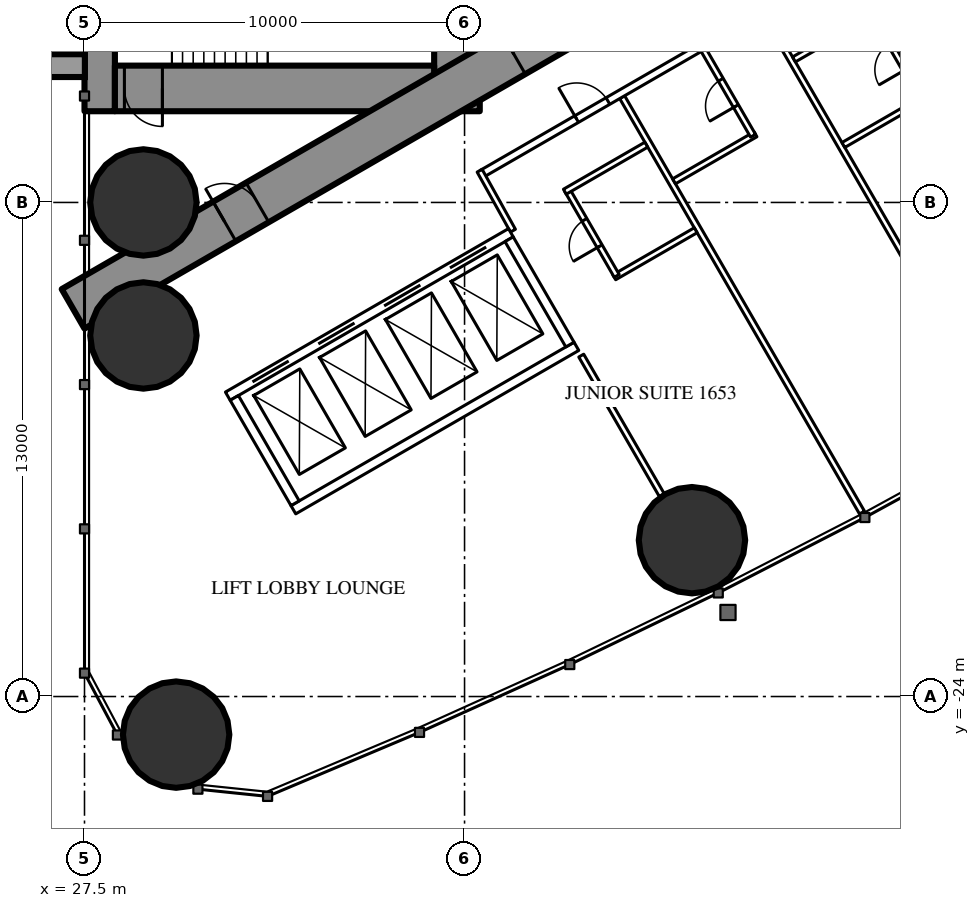
"""IFC4 building model, lengths in metres.
Left out: names, types, materials, properties, quantities, classifications, styles, units other than length and angle.
Written with IfcOpenShell. Run it as: python <this file> out.ifc"""

import sys

from ifc_helpers import new_model, si_unit, direction, frame, frame_2d, origin, origin_2d, place, context, subcontext, project, spatial, rectangle, hollow_circle, extrude, element, fill, save


model = new_model("IFC4")
c1 = context("Model", 3, precision=1e-05, world=origin(), true_north=direction((0.0, 1.0)))
c2 = subcontext(c1, "Body", "Model", "MODEL_VIEW")
j1 = project(units=[si_unit("LENGTHUNIT", "METRE"), si_unit("PLANEANGLEUNIT", "RADIAN")], contexts=[c1])
p1 = place(None, origin())
s1 = spatial("IfcSite", under=j1, at=p1, CompositionType="ELEMENT")
p2 = place(p1, origin())
s2 = spatial("IfcBuilding", under=s1, at=p2, CompositionType="ELEMENT")
p3 = place(p2, frame((0.0, 0.0, 63.5)))
s3 = spatial("IfcBuildingStorey", under=s2, at=p3, CompositionType="ELEMENT", Elevation=63.5)
for number, where, z_axis, x_axis in (
    (1, (29.911, -25.002, 0.0), (0.0, 0.0, 1.0), (1.0, 0.0, 0.0)),
    (2, (29.05, -11.0, 0.0), (0.0, 0.0, 1.0), (1.0, 0.0, 0.0)),
    (3, (29.05, -14.5, 0.0), (0.0, 0.0, 1.0), (1.0, 0.0, 0.0)),
    (4, (43.484, -19.886, 0.0), (0.0, 0.0, 1.0), (1.0, 0.0, 0.0)),
):
    element("IfcColumn", number, at=place(p3, frame(where, z_axis=z_axis, x_axis=x_axis)), inside=s3, PredefinedType="COLUMN", context=c2, shape_type="SweptSolid", body=[
        extrude(hollow_circle(Radius=1.4, WallThickness=0.12, at=origin_2d()), origin(), (0.0, 0.0, 1.0), 3.5),
    ])
p4 = place(p3, frame((27.9, -8.6, 0.0), z_axis=(0.0, 0.0, 1.0), x_axis=(0.0, 1.0, 0.0)))
e5 = element("IfcWall", 5, at=p4, inside=s3, PredefinedType="SHEAR", context=c2, shape_type="SweptSolid", body=[
    extrude(rectangle(XDim=17.2, YDim=0.8, at=frame_2d((8.6, 0.0))), origin(), (0.0, 0.0, 1.0), 3.5),
])
p5 = place(p4, frame((2.45, 0.0, 0.6)))
e6 = element("IfcOpeningElement", 6, at=p5, cuts=e5, PredefinedType="OPENING", context=c2, shape_type="SweptSolid", body=[
    extrude(rectangle(XDim=0.6, YDim=2.1, at=frame_2d((0.3, 1.05))), frame((0.0, 0.41, 0.0), z_axis=(0.0, -1.0, 0.0), x_axis=(1.0, 0.0, 0.0)), (0.0, 0.0, 1.0), 0.82),
])
p6 = place(p4, frame((14.15, 0.0, 0.6)))
e7 = element("IfcOpeningElement", 7, at=p6, cuts=e5, PredefinedType="OPENING", context=c2, shape_type="SweptSolid", body=[
    extrude(rectangle(XDim=0.6, YDim=2.1, at=frame_2d((0.3, 1.05))), frame((0.0, 0.41, 0.0), z_axis=(0.0, -1.0, 0.0), x_axis=(1.0, 0.0, 0.0)), (0.0, 0.0, 1.0), 0.82),
])
p7 = place(p3, frame((37.3, -8.6, 0.0), z_axis=(0.0, 0.0, 1.0), x_axis=(0.0, 1.0, 0.0)))
e8 = element("IfcWall", 8, at=p7, inside=s3, PredefinedType="SHEAR", context=c2, shape_type="SweptSolid", body=[
    extrude(rectangle(XDim=17.2, YDim=1.2, at=frame_2d((8.6, 0.0))), origin(), (0.0, 0.0, 1.0), 3.5),
])
p8 = place(p7, frame((7.7, 0.0, 0.0)))
e9 = element("IfcOpeningElement", 9, at=p8, cuts=e8, PredefinedType="OPENING", context=c2, shape_type="SweptSolid", body=[
    extrude(rectangle(XDim=1.8, YDim=2.2, at=frame_2d((0.9, 1.1))), frame((0.0, 0.61, 0.0), z_axis=(0.0, -1.0, 0.0), x_axis=(1.0, 0.0, 0.0)), (0.0, 0.0, 1.0), 1.22),
])
p9 = place(p3, frame((28.3, -8.0, 0.0), z_axis=(0.0, 0.0, 1.0), x_axis=(1.0, 0.0, 0.0)))
e10 = element("IfcWall", 10, at=p9, inside=s3, PredefinedType="SHEAR", context=c2, shape_type="SweptSolid", body=[
    extrude(rectangle(XDim=8.4, YDim=1.2, at=frame_2d((4.2, 0.0))), origin(), (0.0, 0.0, 1.0), 3.5),
])
p10 = place(p9, frame((0.25, 0.0, 0.0)))
e11 = element("IfcOpeningElement", 11, at=p10, cuts=e10, PredefinedType="OPENING", context=c2, shape_type="SweptSolid", body=[
    extrude(rectangle(XDim=1.0, YDim=2.2, at=frame_2d((0.5, 1.1))), frame((0.0, 0.61, 0.0), z_axis=(0.0, -1.0, 0.0), x_axis=(1.0, 0.0, 0.0)), (0.0, 0.0, 1.0), 1.22),
])
p11 = place(p3, frame((27.2, -13.8, 0.0), z_axis=(0.0, 0.0, 1.0), x_axis=(0.866027159892, 0.499996958321, 0.0)))
e12 = element("IfcWall", 12, at=p11, inside=s3, PredefinedType="SHEAR", context=c2, shape_type="SweptSolid", body=[
    extrude(rectangle(XDim=27.947, YDim=1.2, at=frame_2d((13.973, 0.0))), origin(), (0.0, 0.0, 1.0), 3.5),
])
p12 = place(p11, frame((4.6, 0.0, 0.0)))
e13 = element("IfcOpeningElement", 13, at=p12, cuts=e12, PredefinedType="OPENING", context=c2, shape_type="SweptSolid", body=[
    extrude(rectangle(XDim=1.0, YDim=2.2, at=frame_2d((0.5, 1.1))), frame((0.0, 0.61, 0.0), z_axis=(0.0, -1.0, 0.0), x_axis=(1.0, 0.0, 0.0)), (0.0, 0.0, 1.0), 1.22),
])
p13 = place(p11, frame((13.395, 0.0, 0.0)))
e14 = element("IfcOpeningElement", 14, at=p13, cuts=e12, PredefinedType="OPENING", context=c2, shape_type="SweptSolid", body=[
    extrude(rectangle(XDim=1.8, YDim=2.2, at=frame_2d((0.9, 1.1))), frame((0.0, 0.61, 0.0), z_axis=(0.0, -1.0, 0.0), x_axis=(1.0, 0.0, 0.0)), (0.0, 0.0, 1.0), 1.22),
])
p14 = place(p3, frame((41.647, -8.23, 0.0), z_axis=(0.0, 0.0, 1.0), x_axis=(0.49998590462, -0.866033541603, 0.0)))
e15 = element("IfcWall", 15, at=p14, inside=s3, PredefinedType="PARTITIONING", context=c2, shape_type="SweptSolid", body=[
    extrude(rectangle(XDim=12.621, YDim=0.15, at=frame_2d((6.311, 0.0))), origin(), (0.0, 0.0, 1.0), 3.25),
])
p15 = place(p3, frame((45.403, -6.062, 0.0), z_axis=(0.0, 0.0, 1.0), x_axis=(0.500007077968, -0.866021317279, 0.0)))
e16 = element("IfcWall", 16, at=p15, inside=s3, PredefinedType="PARTITIONING", context=c2, shape_type="SweptSolid", body=[
    extrude(rectangle(XDim=12.721, YDim=0.15, at=frame_2d((6.361, 0.0))), origin(), (0.0, 0.0, 1.0), 3.25),
])
p16 = place(p3, frame((40.57, -15.03, 0.0), z_axis=(0.0, 0.0, 1.0), x_axis=(0.500012993597, -0.866017901798, 0.0)))
e17 = element("IfcWall", 17, at=p16, inside=s3, PredefinedType="PARTITIONING", context=c2, shape_type="SweptSolid", body=[
    extrude(rectangle(XDim=4.243, YDim=0.15, at=frame_2d((2.122, 0.0))), origin(), (0.0, 0.0, 1.0), 3.25),
])
p17 = place(p3, frame((37.96, -10.243, 0.0), z_axis=(0.0, 0.0, 1.0), x_axis=(0.866026429433, 0.499998223521, 0.0)))
e18 = element("IfcWall", 18, at=p17, inside=s3, PredefinedType="PARTITIONING", context=c2, shape_type="SweptSolid", body=[
    extrude(rectangle(XDim=20.487, YDim=0.2, at=frame_2d((10.243, 0.0))), origin(), (0.0, 0.0, 1.0), 3.25),
])
p18 = place(p17, frame((6.925, 0.0, 0.0)))
e19 = element("IfcOpeningElement", 19, at=p18, cuts=e18, PredefinedType="OPENING", context=c2, shape_type="SweptSolid", body=[
    extrude(rectangle(XDim=0.95, YDim=2.2, at=frame_2d((0.475, 1.1))), frame((0.0, 0.11, 0.0), z_axis=(0.0, -1.0, 0.0), x_axis=(1.0, 0.0, 0.0)), (0.0, 0.0, 1.0), 0.22),
])
p19 = place(p17, frame((8.912, 0.0, 0.0)))
e20 = element("IfcOpeningElement", 20, at=p19, cuts=e18, PredefinedType="OPENING", context=c2, shape_type="SweptSolid", body=[
    extrude(rectangle(XDim=0.95, YDim=2.2, at=frame_2d((0.475, 1.1))), frame((0.0, 0.11, 0.0), z_axis=(0.0, -1.0, 0.0), x_axis=(1.0, 0.0, 0.0)), (0.0, 0.0, 1.0), 0.22),
])
p20 = place(p17, frame((13.535, 0.0, 0.0)))
e21 = element("IfcOpeningElement", 21, at=p20, cuts=e18, PredefinedType="OPENING", context=c2, shape_type="SweptSolid", body=[
    extrude(rectangle(XDim=0.95, YDim=2.2, at=frame_2d((0.475, 1.1))), frame((0.0, 0.11, 0.0), z_axis=(0.0, -1.0, 0.0), x_axis=(1.0, 0.0, 0.0)), (0.0, 0.0, 1.0), 0.22),
])
p21 = place(p17, frame((17.585, 0.0, 0.0)))
e22 = element("IfcOpeningElement", 22, at=p21, cuts=e18, PredefinedType="OPENING", context=c2, shape_type="SweptSolid", body=[
    extrude(rectangle(XDim=0.95, YDim=2.2, at=frame_2d((0.475, 1.1))), frame((0.0, 0.11, 0.0), z_axis=(0.0, -1.0, 0.0), x_axis=(1.0, 0.0, 0.0)), (0.0, 0.0, 1.0), 0.22),
])
p22 = place(p17, frame((2.875, 0.0, 0.0)))
e23 = element("IfcOpeningElement", 23, at=p22, cuts=e18, PredefinedType="OPENING", context=c2, shape_type="SweptSolid", body=[
    extrude(rectangle(XDim=0.95, YDim=2.2, at=frame_2d((0.475, 1.1))), frame((0.0, 0.11, 0.0), z_axis=(0.0, -1.0, 0.0), x_axis=(1.0, 0.0, 0.0)), (0.0, 0.0, 1.0), 0.22),
])
p23 = place(p3, frame((38.773, -11.742, 0.0), z_axis=(0.0, 0.0, 1.0), x_axis=(-0.485528096672, 0.8742210632, 0.0)))
e24 = element("IfcWall", 24, at=p23, inside=s3, PredefinedType="PARTITIONING", context=c2, shape_type="SweptSolid", body=[
    extrude(rectangle(XDim=1.805, YDim=0.15, at=frame_2d((0.903, 0.0))), origin(), (0.0, 0.0, 1.0), 3.25),
])
p24 = place(p3, frame((43.012, -10.444, 0.0), z_axis=(0.0, 0.0, 1.0), x_axis=(0.866031185235, 0.4999899861, 0.0)))
e25 = element("IfcWall", 25, at=p24, inside=s3, PredefinedType="PARTITIONING", context=c2, shape_type="SweptSolid", body=[
    extrude(rectangle(XDim=2.475, YDim=0.15, at=frame_2d((1.238, 0.0))), origin(), (0.0, 0.0, 1.0), 3.25),
])
p25 = place(p3, frame((43.791, -6.993, 0.0), z_axis=(0.0, 0.0, 1.0), x_axis=(0.500047596559, -0.865997922154, 0.0)))
e26 = element("IfcWall", 26, at=p25, inside=s3, PredefinedType="PARTITIONING", context=c2, shape_type="SweptSolid", body=[
    extrude(rectangle(XDim=2.6, YDim=0.15, at=frame_2d((1.3, 0.0))), origin(), (0.0, 0.0, 1.0), 3.25),
])
p26 = place(p25, frame((0.9, 0.0, 0.0)))
e27 = element("IfcOpeningElement", 27, at=p26, cuts=e26, PredefinedType="OPENING", context=c2, shape_type="SweptSolid", body=[
    extrude(rectangle(XDim=0.8, YDim=2.2, at=frame_2d((0.4, 1.1))), frame((0.0, 0.085, 0.0), z_axis=(0.0, -1.0, 0.0), x_axis=(1.0, 0.0, 0.0)), (0.0, 0.0, 1.0), 0.17),
])
p27 = place(p3, frame((47.468, -9.488, 0.0), z_axis=(0.0, 0.0, 1.0), x_axis=(0.86604923931, 0.499958713387, 0.0)))
e28 = element("IfcWall", 28, at=p27, inside=s3, PredefinedType="PARTITIONING", context=c2, shape_type="SweptSolid", body=[
    extrude(rectangle(XDim=2.475, YDim=0.15, at=frame_2d((1.237, 0.0))), origin(), (0.0, 0.0, 1.0), 3.25),
])
p28 = place(p3, frame((48.246, -6.037, 0.0), z_axis=(0.0, 0.0, 1.0), x_axis=(0.500006934395, -0.866021400173, 0.0)))
e29 = element("IfcWall", 29, at=p28, inside=s3, PredefinedType="PARTITIONING", context=c2, shape_type="SweptSolid", body=[
    extrude(rectangle(XDim=2.6, YDim=0.15, at=frame_2d((1.3, 0.0))), origin(), (0.0, 0.0, 1.0), 3.25),
])
p29 = place(p28, frame((0.9, 0.0, 0.0)))
e30 = element("IfcOpeningElement", 30, at=p29, cuts=e29, PredefinedType="OPENING", context=c2, shape_type="SweptSolid", body=[
    extrude(rectangle(XDim=0.8, YDim=2.2, at=frame_2d((0.4, 1.1))), frame((0.0, 0.085, 0.0), z_axis=(0.0, -1.0, 0.0), x_axis=(1.0, 0.0, 0.0)), (0.0, 0.0, 1.0), 0.17),
])
p30 = place(p3, frame((46.168, -7.237, 0.0), z_axis=(0.0, 0.0, 1.0), x_axis=(0.866006523861, 0.500032699561, 0.0)))
e31 = element("IfcWall", 31, at=p30, inside=s3, PredefinedType="PARTITIONING", context=c2, shape_type="SweptSolid", body=[
    extrude(rectangle(XDim=2.475, YDim=0.15, at=frame_2d((1.237, 0.0))), origin(), (0.0, 0.0, 1.0), 3.25),
])
p31 = place(p3, frame((41.439, -12.969, 0.0), z_axis=(0.0, 0.0, 1.0), x_axis=(0.866031185235, 0.4999899861, 0.0)))
e32 = element("IfcWall", 32, at=p31, inside=s3, PredefinedType="PARTITIONING", context=c2, shape_type="SweptSolid", body=[
    extrude(rectangle(XDim=2.475, YDim=0.15, at=frame_2d((1.238, 0.0))), origin(), (0.0, 0.0, 1.0), 3.25),
])
p32 = place(p3, frame((40.204, -10.68, 0.0), z_axis=(0.0, 0.0, 1.0), x_axis=(0.500006934395, -0.866021400173, 0.0)))
e33 = element("IfcWall", 33, at=p32, inside=s3, PredefinedType="PARTITIONING", context=c2, shape_type="SweptSolid", body=[
    extrude(rectangle(XDim=2.6, YDim=0.15, at=frame_2d((1.3, 0.0))), origin(), (0.0, 0.0, 1.0), 3.25),
])
p33 = place(p32, frame((0.9, 0.0, 0.0)))
e34 = element("IfcOpeningElement", 34, at=p33, cuts=e33, PredefinedType="OPENING", context=c2, shape_type="SweptSolid", body=[
    extrude(rectangle(XDim=0.8, YDim=2.2, at=frame_2d((0.4, 1.1))), frame((0.0, 0.085, 0.0), z_axis=(0.0, -1.0, 0.0), x_axis=(1.0, 0.0, 0.0)), (0.0, 0.0, 1.0), 0.17),
])
p34 = place(p3, frame((40.139, -10.718, 0.0), z_axis=(0.0, 0.0, 1.0), x_axis=(0.866031185235, 0.4999899861, 0.0)))
e35 = element("IfcWall", 35, at=p34, inside=s3, PredefinedType="PARTITIONING", context=c2, shape_type="SweptSolid", body=[
    extrude(rectangle(XDim=2.475, YDim=0.15, at=frame_2d((1.238, 0.0))), origin(), (0.0, 0.0, 1.0), 3.25),
])
p35 = place(p3, frame((31.271, -16.097, 0.0), z_axis=(0.0, 0.0, 1.0), x_axis=(0.86604045752, 0.499973925258, 0.0)))
e36 = element("IfcWall", 36, at=p35, inside=s3, PredefinedType="PARTITIONING", context=c2, shape_type="SweptSolid", body=[
    extrude(rectangle(XDim=8.6, YDim=0.25, at=frame_2d((4.3, 0.0))), origin(), (0.0, 0.0, 1.0), 3.25),
])
p36 = place(p35, frame((0.75, 0.0, 0.0)))
e37 = element("IfcOpeningElement", 37, at=p36, cuts=e36, PredefinedType="OPENING", context=c2, shape_type="SweptSolid", body=[
    extrude(rectangle(XDim=1.1, YDim=2.2, at=frame_2d((0.55, 1.1))), frame((0.0, 0.135, 0.0), z_axis=(0.0, -1.0, 0.0), x_axis=(1.0, 0.0, 0.0)), (0.0, 0.0, 1.0), 0.27),
])
p37 = place(p35, frame((2.75, 0.0, 0.0)))
e38 = element("IfcOpeningElement", 38, at=p37, cuts=e36, PredefinedType="OPENING", context=c2, shape_type="SweptSolid", body=[
    extrude(rectangle(XDim=1.1, YDim=2.2, at=frame_2d((0.55, 1.1))), frame((0.0, 0.135, 0.0), z_axis=(0.0, -1.0, 0.0), x_axis=(1.0, 0.0, 0.0)), (0.0, 0.0, 1.0), 0.27),
])
p38 = place(p35, frame((4.75, 0.0, 0.0)))
e39 = element("IfcOpeningElement", 39, at=p38, cuts=e36, PredefinedType="OPENING", context=c2, shape_type="SweptSolid", body=[
    extrude(rectangle(XDim=1.1, YDim=2.2, at=frame_2d((0.55, 1.1))), frame((0.0, 0.135, 0.0), z_axis=(0.0, -1.0, 0.0), x_axis=(1.0, 0.0, 0.0)), (0.0, 0.0, 1.0), 0.27),
])
p39 = place(p35, frame((6.75, 0.0, 0.0)))
e40 = element("IfcOpeningElement", 40, at=p39, cuts=e36, PredefinedType="OPENING", context=c2, shape_type="SweptSolid", body=[
    extrude(rectangle(XDim=1.1, YDim=2.2, at=frame_2d((0.55, 1.1))), frame((0.0, 0.135, 0.0), z_axis=(0.0, -1.0, 0.0), x_axis=(1.0, 0.0, 0.0)), (0.0, 0.0, 1.0), 0.27),
])
p40 = place(p3, frame((32.996, -19.086, 0.0), z_axis=(0.0, 0.0, 1.0), x_axis=(0.866028165386, 0.499995216735, 0.0)))
e41 = element("IfcWall", 41, at=p40, inside=s3, PredefinedType="PARTITIONING", context=c2, shape_type="SweptSolid", body=[
    extrude(rectangle(XDim=8.6, YDim=0.25, at=frame_2d((4.3, 0.0))), origin(), (0.0, 0.0, 1.0), 3.25),
])
for number, where, z_axis, x_axis in (
    (42, (31.441, -16.143, 0.0), (0.0, 0.0, 1.0), (0.5, -0.866, 0.0)),
    (43, (38.673, -11.968, 0.0), (0.0, 0.0, 1.0), (0.5, -0.866, 0.0)),
):
    element("IfcWall", number, at=place(p3, frame(where, z_axis=z_axis, x_axis=x_axis)), inside=s3, PredefinedType="PARTITIONING", context=c2, shape_type="SweptSolid", body=[
        extrude(rectangle(XDim=3.201, YDim=0.25, at=frame_2d((1.6, 0.0))), origin(), (0.0, 0.0, 1.0), 3.25),
    ])
p41 = place(p26, origin())
e44 = element("IfcDoor", 44, at=p41, inside=s3, OperationType="SINGLE_SWING_RIGHT", PredefinedType="DOOR", context=c2, shape_type="SweptSolid", body=[
    extrude(rectangle(XDim=0.8, YDim=2.2, at=frame_2d((0.4, 1.1))), frame((0.0, 0.025, 0.0), z_axis=(0.0, -1.0, 0.0), x_axis=(1.0, 0.0, 0.0)), (0.0, 0.0, 1.0), 0.05),
])
fill(e27, e44)
p42 = place(p29, origin())
e45 = element("IfcDoor", 45, at=p42, inside=s3, OperationType="SINGLE_SWING_RIGHT", PredefinedType="DOOR", context=c2, shape_type="SweptSolid", body=[
    extrude(rectangle(XDim=0.8, YDim=2.2, at=frame_2d((0.4, 1.1))), frame((0.0, 0.025, 0.0), z_axis=(0.0, -1.0, 0.0), x_axis=(1.0, 0.0, 0.0)), (0.0, 0.0, 1.0), 0.05),
])
fill(e30, e45)
p43 = place(p33, origin())
e46 = element("IfcDoor", 46, at=p43, inside=s3, OperationType="SINGLE_SWING_RIGHT", PredefinedType="DOOR", context=c2, shape_type="SweptSolid", body=[
    extrude(rectangle(XDim=0.8, YDim=2.2, at=frame_2d((0.4, 1.1))), frame((0.0, 0.025, 0.0), z_axis=(0.0, -1.0, 0.0), x_axis=(1.0, 0.0, 0.0)), (0.0, 0.0, 1.0), 0.05),
])
fill(e34, e46)
p44 = place(p22, origin())
e47 = element("IfcDoor", 47, at=p44, inside=s3, OperationType="SINGLE_SWING_LEFT", PredefinedType="DOOR", context=c2, shape_type="SweptSolid", body=[
    extrude(rectangle(XDim=0.95, YDim=2.2, at=frame_2d((0.475, 1.1))), frame((0.0, 0.025, 0.0), z_axis=(0.0, -1.0, 0.0), x_axis=(1.0, 0.0, 0.0)), (0.0, 0.0, 1.0), 0.05),
])
fill(e23, e47)
p45 = place(p12, origin())
e48 = element("IfcDoor", 48, at=p45, inside=s3, OperationType="SINGLE_SWING_LEFT", PredefinedType="DOOR", context=c2, shape_type="SweptSolid", body=[
    extrude(rectangle(XDim=1.0, YDim=2.2, at=frame_2d((0.5, 1.1))), frame((0.0, 0.025, 0.0), z_axis=(0.0, -1.0, 0.0), x_axis=(1.0, 0.0, 0.0)), (0.0, 0.0, 1.0), 0.05),
])
fill(e13, e48)
p46 = place(p13, origin())
e49 = element("IfcDoor", 49, at=p46, inside=s3, OperationType="DOUBLE_DOOR_SINGLE_SWING", PredefinedType="DOOR", context=c2, shape_type="SweptSolid", body=[
    extrude(rectangle(XDim=1.8, YDim=2.2, at=frame_2d((0.9, 1.1))), frame((0.0, 0.025, 0.0), z_axis=(0.0, -1.0, 0.0), x_axis=(1.0, 0.0, 0.0)), (0.0, 0.0, 1.0), 0.05),
])
fill(e14, e49)
p47 = place(p10, origin())
e50 = element("IfcDoor", 50, at=p47, inside=s3, OperationType="SINGLE_SWING_RIGHT", PredefinedType="DOOR", context=c2, shape_type="SweptSolid", body=[
    extrude(rectangle(XDim=1.0, YDim=2.2, at=frame_2d((0.5, 1.1))), frame((0.0, 0.025, 0.0), z_axis=(0.0, -1.0, 0.0), x_axis=(1.0, 0.0, 0.0)), (0.0, 0.0, 1.0), 0.05),
])
fill(e11, e50)
p48 = place(p36, origin())
e51 = element("IfcDoor", 51, at=p48, inside=s3, OperationType="DOUBLE_DOOR_SLIDING", PredefinedType="USERDEFINED", context=c2, shape_type="SweptSolid", body=[
    extrude(rectangle(XDim=1.1, YDim=2.2, at=frame_2d((0.55, 1.1))), frame((0.0, 0.025, 0.0), z_axis=(0.0, -1.0, 0.0), x_axis=(1.0, 0.0, 0.0)), (0.0, 0.0, 1.0), 0.05),
])
fill(e37, e51)
p49 = place(p37, origin())
e52 = element("IfcDoor", 52, at=p49, inside=s3, OperationType="DOUBLE_DOOR_SLIDING", PredefinedType="USERDEFINED", context=c2, shape_type="SweptSolid", body=[
    extrude(rectangle(XDim=1.1, YDim=2.2, at=frame_2d((0.55, 1.1))), frame((0.0, 0.025, 0.0), z_axis=(0.0, -1.0, 0.0), x_axis=(1.0, 0.0, 0.0)), (0.0, 0.0, 1.0), 0.05),
])
fill(e38, e52)
p50 = place(p38, origin())
e53 = element("IfcDoor", 53, at=p50, inside=s3, OperationType="DOUBLE_DOOR_SLIDING", PredefinedType="USERDEFINED", context=c2, shape_type="SweptSolid", body=[
    extrude(rectangle(XDim=1.1, YDim=2.2, at=frame_2d((0.55, 1.1))), frame((0.0, 0.025, 0.0), z_axis=(0.0, -1.0, 0.0), x_axis=(1.0, 0.0, 0.0)), (0.0, 0.0, 1.0), 0.05),
])
fill(e39, e53)
p51 = place(p39, origin())
e54 = element("IfcDoor", 54, at=p51, inside=s3, OperationType="DOUBLE_DOOR_SLIDING", PredefinedType="USERDEFINED", context=c2, shape_type="SweptSolid", body=[
    extrude(rectangle(XDim=1.1, YDim=2.2, at=frame_2d((0.55, 1.1))), frame((0.0, 0.025, 0.0), z_axis=(0.0, -1.0, 0.0), x_axis=(1.0, 0.0, 0.0)), (0.0, 0.0, 1.0), 0.05),
])
fill(e40, e54)
save(model, sys.argv[1])
